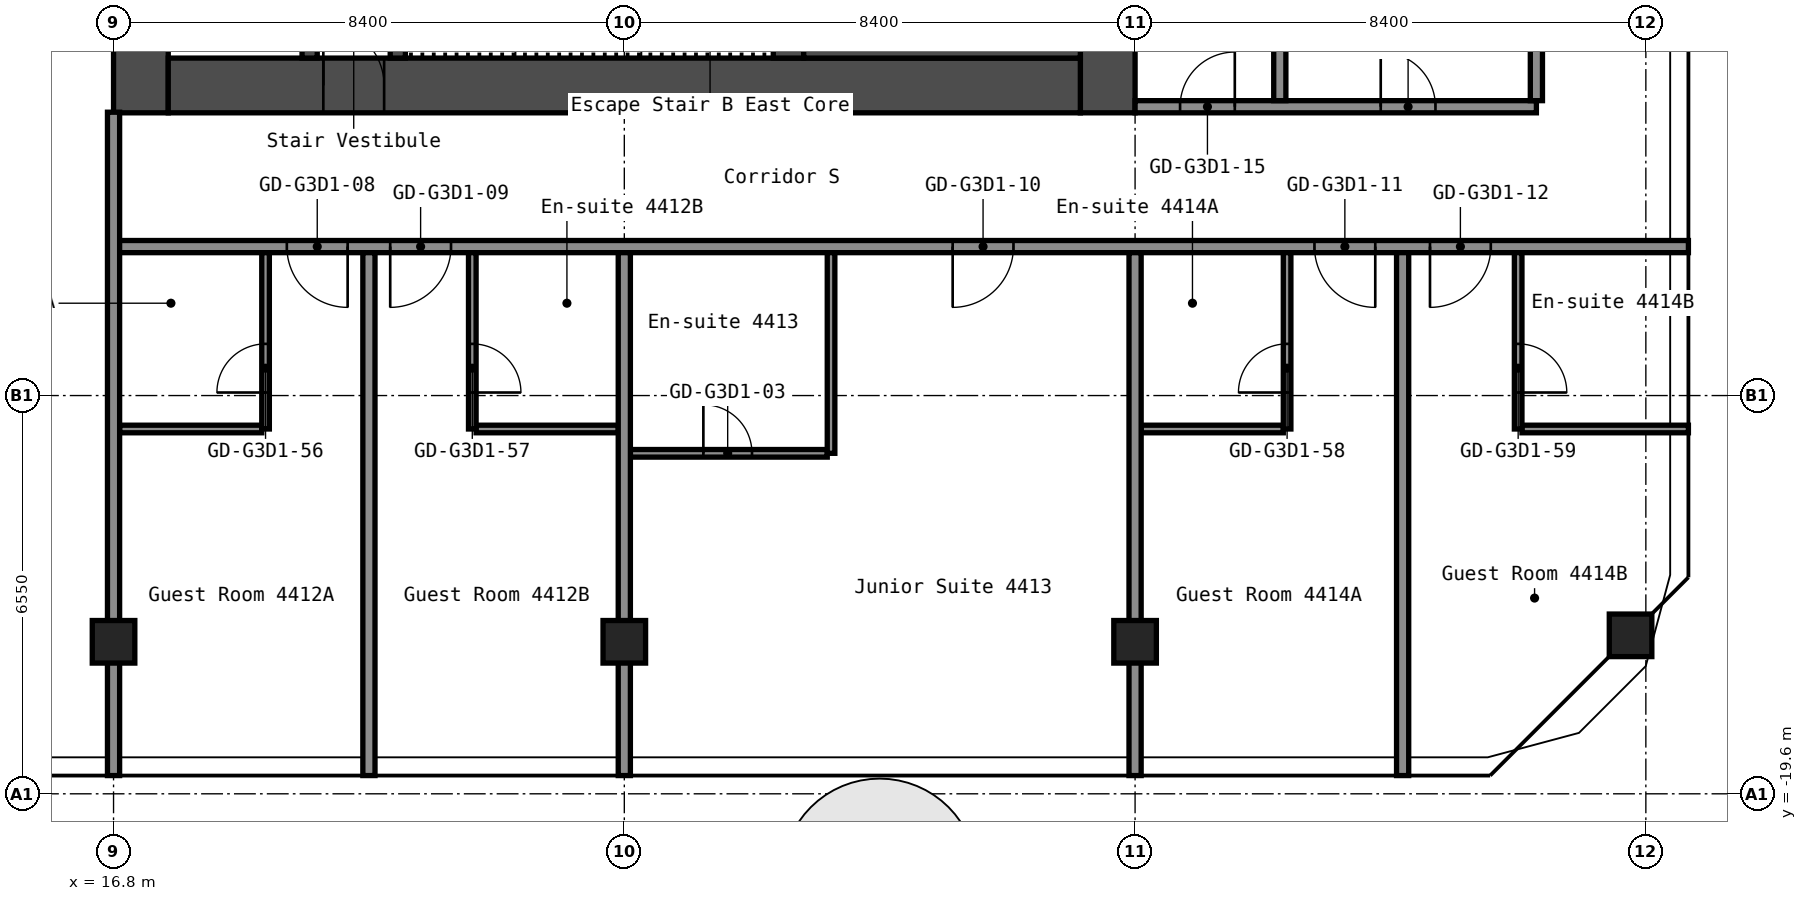
"""IFC4 building model, lengths in metres.
Left out: names, types, materials, properties, quantities, classifications, styles, units other than length and angle.
Written with IfcOpenShell. Run it as: python <this file> out.ifc"""

import sys

from ifc_helpers import new_model, si_unit, direction, frame, frame_2d, origin, origin_2d, place, context, subcontext, project, spatial, rectangle, hollow_rectangle, extrude, element, fill, save


model = new_model("IFC4")
c1 = context("Model", 3, precision=1e-05, world=origin(), true_north=direction((0.0, 1.0)))
c2 = subcontext(c1, "Body", "Model", "MODEL_VIEW")
j1 = project(units=[si_unit("LENGTHUNIT", "METRE"), si_unit("PLANEANGLEUNIT", "RADIAN")], contexts=[c1])
p1 = place(None, origin())
s1 = spatial("IfcSite", under=j1, at=p1, CompositionType="ELEMENT")
p2 = place(p1, origin())
s2 = spatial("IfcBuilding", under=s1, at=p2, CompositionType="ELEMENT")
p3 = place(p2, frame((0.0, 0.0, 156.6)))
s3 = spatial("IfcBuildingStorey", under=s2, at=p3, CompositionType="ELEMENT", Elevation=156.6)
for number, where, z_axis, x_axis in (
    (1, (16.8, -17.1, 0.0), (0.0, 0.0, 1.0), (1.0, 0.0, 0.0)),
    (2, (25.2, -17.1, 0.0), (0.0, 0.0, 1.0), (1.0, 0.0, 0.0)),
    (3, (33.6, -17.1, 0.0), (0.0, 0.0, 1.0), (1.0, 0.0, 0.0)),
    (4, (41.749, -16.994, 0.0), (0.0, 0.0, 1.0), (1.0, 0.0, 0.0)),
):
    element("IfcColumn", number, at=place(p3, frame(where, z_axis=z_axis, x_axis=x_axis)), inside=s3, PredefinedType="COLUMN", context=c2, shape_type="SweptSolid", body=[
        extrude(hollow_rectangle(XDim=0.7, YDim=0.7, WallThickness=0.028, at=origin_2d()), origin(), (0.0, 0.0, 1.0), 2.75),
    ])
p4 = place(p3, frame((17.25, -8.4, 0.0), z_axis=(0.0, 0.0, 1.0), x_axis=(0.0, 1.0, 0.0)))
e5 = element("IfcWall", 5, at=p4, inside=s3, PredefinedType="SHEAR", context=c2, shape_type="SweptSolid", body=[
    extrude(rectangle(XDim=16.8, YDim=0.9, at=frame_2d((8.4, 0.0))), origin(), (0.0, 0.0, 1.0), 2.75),
])
p5 = place(p4, frame((7.1, 0.0, 0.0)))
e6 = element("IfcOpeningElement", 6, at=p5, cuts=e5, PredefinedType="OPENING", context=c2, shape_type="SweptSolid", body=[
    extrude(rectangle(XDim=1.6, YDim=2.1, at=frame_2d((0.8, 1.05))), frame((0.0, 0.46, 0.0), z_axis=(0.0, -1.0, 0.0), x_axis=(1.0, 0.0, 0.0)), (0.0, 0.0, 1.0), 0.92),
])
p6 = place(p3, frame((33.15, -8.4, 0.0), z_axis=(0.0, 0.0, 1.0), x_axis=(0.0, 1.0, 0.0)))
e7 = element("IfcWall", 7, at=p6, inside=s3, PredefinedType="SHEAR", context=c2, shape_type="SweptSolid", body=[
    extrude(rectangle(XDim=16.8, YDim=0.9, at=frame_2d((8.4, 0.0))), origin(), (0.0, 0.0, 1.0), 2.75),
])
p7 = place(p3, frame((17.7, -7.95, 0.0), z_axis=(0.0, 0.0, 1.0), x_axis=(1.0, 0.0, 0.0)))
e8 = element("IfcWall", 8, at=p7, inside=s3, PredefinedType="SHEAR", context=c2, shape_type="SweptSolid", body=[
    extrude(rectangle(XDim=15.0, YDim=0.9, at=frame_2d((7.5, 0.0))), origin(), (0.0, 0.0, 1.0), 2.75),
])
p8 = place(p7, frame((2.55, 0.0, 0.0)))
e9 = element("IfcOpeningElement", 9, at=p8, cuts=e8, PredefinedType="OPENING", context=c2, shape_type="SweptSolid", body=[
    extrude(rectangle(XDim=1.0, YDim=2.1, at=frame_2d((0.5, 1.05))), frame((0.0, 0.46, 0.0), z_axis=(0.0, -1.0, 0.0), x_axis=(1.0, 0.0, 0.0)), (0.0, 0.0, 1.0), 0.92),
])
p9 = place(p3, frame((20.025, -7.5, 0.0), z_axis=(0.0, 0.0, 1.0), x_axis=(0.0, 1.0, 0.0)))
e10 = element("IfcWall", 10, at=p9, inside=s3, PredefinedType="SHEAR", context=c2, shape_type="SweptSolid", body=[
    extrude(rectangle(XDim=6.3, YDim=0.25, at=frame_2d((3.15, 0.0))), origin(), (0.0, 0.0, 1.0), 2.75),
])
p10 = place(p9, frame((2.4, 0.0, 0.0)))
e11 = element("IfcOpeningElement", 11, at=p10, cuts=e10, PredefinedType="OPENING", context=c2, shape_type="SweptSolid", body=[
    extrude(rectangle(XDim=1.0, YDim=2.1, at=frame_2d((0.5, 1.05))), frame((0.0, 0.135, 0.0), z_axis=(0.0, -1.0, 0.0), x_axis=(1.0, 0.0, 0.0)), (0.0, 0.0, 1.0), 0.27),
])
p11 = place(p3, frame((21.475, -7.5, 0.0), z_axis=(0.0, 0.0, 1.0), x_axis=(0.0, 1.0, 0.0)))
e12 = element("IfcWall", 12, at=p11, inside=s3, PredefinedType="SHEAR", context=c2, shape_type="SweptSolid", body=[
    extrude(rectangle(XDim=3.75, YDim=0.25, at=frame_2d((1.875, 0.0))), origin(), (0.0, 0.0, 1.0), 2.75),
])
p12 = place(p11, frame((1.3, 0.0, 0.0)))
e13 = element("IfcOpeningElement", 13, at=p12, cuts=e12, PredefinedType="OPENING", context=c2, shape_type="SweptSolid", body=[
    extrude(rectangle(XDim=1.2, YDim=2.1, at=frame_2d((0.6, 1.05))), frame((0.0, 0.135, 0.0), z_axis=(0.0, -1.0, 0.0), x_axis=(1.0, 0.0, 0.0)), (0.0, 0.0, 1.0), 0.27),
])
p13 = place(p3, frame((27.9, -7.5, 0.0), z_axis=(0.0, 0.0, 1.0), x_axis=(0.0, 1.0, 0.0)))
e14 = element("IfcWall", 14, at=p13, inside=s3, PredefinedType="SHEAR", context=c2, shape_type="SweptSolid", body=[
    extrude(rectangle(XDim=3.75, YDim=0.5, at=frame_2d((1.875, 0.0))), origin(), (0.0, 0.0, 1.0), 2.75),
])
p14 = place(p3, frame((28.15, -6.75, 0.0), z_axis=(0.0, 0.0, 1.0), x_axis=(1.0, 0.0, 0.0)))
e15 = element("IfcWall", 15, at=p14, inside=s3, PredefinedType="SHEAR", context=c2, shape_type="SweptSolid", body=[
    extrude(rectangle(XDim=4.55, YDim=1.5, at=frame_2d((2.275, 0.0))), origin(), (0.0, 0.0, 1.0), 2.75),
])
p15 = place(p3, frame((25.3, -14.0, 0.0), z_axis=(0.0, 0.0, 1.0), x_axis=(1.0, 0.0, 0.0)))
e16 = element("IfcWall", 16, at=p15, inside=s3, PredefinedType="PARTITIONING", context=c2, shape_type="SweptSolid", body=[
    extrude(rectangle(XDim=3.238, YDim=0.125, at=frame_2d((1.619, 0.0))), origin(), (0.0, 0.0, 1.0), 2.75),
])
p16 = place(p15, frame((1.2, 0.0, 0.0)))
e17 = element("IfcOpeningElement", 17, at=p16, cuts=e16, PredefinedType="OPENING", context=c2, shape_type="SweptSolid", body=[
    extrude(rectangle(XDim=0.8, YDim=2.1, at=frame_2d((0.4, 1.05))), frame((0.0, 0.073, 0.0), z_axis=(0.0, -1.0, 0.0), x_axis=(1.0, 0.0, 0.0)), (0.0, 0.0, 1.0), 0.145),
])
for number, where, z_axis, x_axis in (
    (18, (16.9, -13.6, 0.0), (0.0, 0.0, 1.0), (1.0, 0.0, 0.0)),
    (19, (22.762, -13.6, 0.0), (0.0, 0.0, 1.0), (1.0, 0.0, 0.0)),
    (20, (33.7, -13.6, 0.0), (0.0, 0.0, 1.0), (1.0, 0.0, 0.0)),
):
    element("IfcWall", number, at=place(p3, frame(where, z_axis=z_axis, x_axis=x_axis)), inside=s3, PredefinedType="PARTITIONING", context=c2, shape_type="SweptSolid", body=[
        extrude(rectangle(XDim=2.338, YDim=0.125, at=frame_2d((1.169, 0.0))), origin(), (0.0, 0.0, 1.0), 2.75),
    ])
p17 = place(p3, frame((39.962, -13.6, 0.0), z_axis=(0.0, 0.0, 1.0), x_axis=(1.0, 0.0, 0.0)))
e21 = element("IfcWall", 21, at=p17, inside=s3, PredefinedType="PARTITIONING", context=c2, shape_type="SweptSolid", body=[
    extrude(rectangle(XDim=2.738, YDim=0.125, at=frame_2d((1.369, 0.0))), origin(), (0.0, 0.0, 1.0), 2.75),
])
p18 = place(p3, frame((16.8, -10.6, 0.0), z_axis=(0.0, 0.0, 1.0), x_axis=(1.0, 0.0, 0.0)))
e22 = element("IfcWall", 22, at=p18, inside=s3, PredefinedType="PARTITIONING", context=c2, shape_type="SweptSolid", body=[
    extrude(rectangle(XDim=25.9, YDim=0.2, at=frame_2d((12.95, 0.0))), origin(), (0.0, 0.0, 1.0), 2.75),
])
p19 = place(p18, frame((2.85, 0.0, 0.0)))
e23 = element("IfcOpeningElement", 23, at=p19, cuts=e22, PredefinedType="OPENING", context=c2, shape_type="SweptSolid", body=[
    extrude(rectangle(XDim=1.0, YDim=2.1, at=frame_2d((0.5, 1.05))), frame((0.0, 0.11, 0.0), z_axis=(0.0, -1.0, 0.0), x_axis=(1.0, 0.0, 0.0)), (0.0, 0.0, 1.0), 0.22),
])
p20 = place(p18, frame((4.55, 0.0, 0.0)))
e24 = element("IfcOpeningElement", 24, at=p20, cuts=e22, PredefinedType="OPENING", context=c2, shape_type="SweptSolid", body=[
    extrude(rectangle(XDim=1.0, YDim=2.1, at=frame_2d((0.5, 1.05))), frame((0.0, 0.11, 0.0), z_axis=(0.0, -1.0, 0.0), x_axis=(1.0, 0.0, 0.0)), (0.0, 0.0, 1.0), 0.22),
])
p21 = place(p18, frame((13.8, 0.0, 0.0)))
e25 = element("IfcOpeningElement", 25, at=p21, cuts=e22, PredefinedType="OPENING", context=c2, shape_type="SweptSolid", body=[
    extrude(rectangle(XDim=1.0, YDim=2.1, at=frame_2d((0.5, 1.05))), frame((0.0, 0.11, 0.0), z_axis=(0.0, -1.0, 0.0), x_axis=(1.0, 0.0, 0.0)), (0.0, 0.0, 1.0), 0.22),
])
p22 = place(p18, frame((19.75, 0.0, 0.0)))
e26 = element("IfcOpeningElement", 26, at=p22, cuts=e22, PredefinedType="OPENING", context=c2, shape_type="SweptSolid", body=[
    extrude(rectangle(XDim=1.0, YDim=2.1, at=frame_2d((0.5, 1.05))), frame((0.0, 0.11, 0.0), z_axis=(0.0, -1.0, 0.0), x_axis=(1.0, 0.0, 0.0)), (0.0, 0.0, 1.0), 0.22),
])
p23 = place(p18, frame((21.65, 0.0, 0.0)))
e27 = element("IfcOpeningElement", 27, at=p23, cuts=e22, PredefinedType="OPENING", context=c2, shape_type="SweptSolid", body=[
    extrude(rectangle(XDim=1.0, YDim=2.1, at=frame_2d((0.5, 1.05))), frame((0.0, 0.11, 0.0), z_axis=(0.0, -1.0, 0.0), x_axis=(1.0, 0.0, 0.0)), (0.0, 0.0, 1.0), 0.22),
])
p24 = place(p3, frame((33.6, -8.3, 0.0), z_axis=(0.0, 0.0, 1.0), x_axis=(1.0, 0.0, 0.0)))
e28 = element("IfcWall", 28, at=p24, inside=s3, PredefinedType="PARTITIONING", context=c2, shape_type="SweptSolid", body=[
    extrude(rectangle(XDim=6.6, YDim=0.2, at=frame_2d((3.3, 0.0))), origin(), (0.0, 0.0, 1.0), 2.75),
])
p25 = place(p24, frame((0.74, 0.0, 0.0)))
e29 = element("IfcOpeningElement", 29, at=p25, cuts=e28, PredefinedType="OPENING", context=c2, shape_type="SweptSolid", body=[
    extrude(rectangle(XDim=0.9, YDim=2.1, at=frame_2d((0.45, 1.05))), frame((0.0, 0.11, 0.0), z_axis=(0.0, -1.0, 0.0), x_axis=(1.0, 0.0, 0.0)), (0.0, 0.0, 1.0), 0.22),
])
p26 = place(p24, frame((4.04, 0.0, 0.0)))
e30 = element("IfcOpeningElement", 30, at=p26, cuts=e28, PredefinedType="OPENING", context=c2, shape_type="SweptSolid", body=[
    extrude(rectangle(XDim=0.9, YDim=2.1, at=frame_2d((0.45, 1.05))), frame((0.0, 0.11, 0.0), z_axis=(0.0, -1.0, 0.0), x_axis=(1.0, 0.0, 0.0)), (0.0, 0.0, 1.0), 0.22),
])
p27 = place(p3, frame((16.8, -19.3, 0.0), z_axis=(0.0, 0.0, 1.0), x_axis=(0.0, 1.0, 0.0)))
e31 = element("IfcWall", 31, at=p27, inside=s3, PredefinedType="PARTITIONING", context=c2, shape_type="SweptSolid", body=[
    extrude(rectangle(XDim=10.91, YDim=0.2, at=frame_2d((5.455, 0.0))), origin(), (0.0, 0.0, 1.0), 2.75),
])
p28 = place(p3, frame((19.3, -13.6, 0.0), z_axis=(0.0, 0.0, 1.0), x_axis=(0.0, 1.0, 0.0)))
e32 = element("IfcWall", 32, at=p28, inside=s3, PredefinedType="PARTITIONING", context=c2, shape_type="SweptSolid", body=[
    extrude(rectangle(XDim=2.9, YDim=0.125, at=frame_2d((1.45, 0.0))), origin(), (0.0, 0.0, 1.0), 2.75),
])
p29 = place(p28, frame((0.6, 0.0, 0.0)))
e33 = element("IfcOpeningElement", 33, at=p29, cuts=e32, PredefinedType="OPENING", context=c2, shape_type="SweptSolid", body=[
    extrude(rectangle(XDim=0.8, YDim=2.1, at=frame_2d((0.4, 1.05))), frame((0.0, 0.073, 0.0), z_axis=(0.0, -1.0, 0.0), x_axis=(1.0, 0.0, 0.0)), (0.0, 0.0, 1.0), 0.145),
])
p30 = place(p3, frame((21.0, -19.3, 0.0), z_axis=(0.0, 0.0, 1.0), x_axis=(0.0, 1.0, 0.0)))
e34 = element("IfcWall", 34, at=p30, inside=s3, PredefinedType="PARTITIONING", context=c2, shape_type="SweptSolid", body=[
    extrude(rectangle(XDim=8.6, YDim=0.2, at=frame_2d((4.3, 0.0))), origin(), (0.0, 0.0, 1.0), 2.75),
])
p31 = place(p3, frame((22.7, -13.6, 0.0), z_axis=(0.0, 0.0, 1.0), x_axis=(0.0, 1.0, 0.0)))
e35 = element("IfcWall", 35, at=p31, inside=s3, PredefinedType="PARTITIONING", context=c2, shape_type="SweptSolid", body=[
    extrude(rectangle(XDim=2.9, YDim=0.125, at=frame_2d((1.45, 0.0))), origin(), (0.0, 0.0, 1.0), 2.75),
])
p32 = place(p31, frame((0.6, 0.0, 0.0)))
e36 = element("IfcOpeningElement", 36, at=p32, cuts=e35, PredefinedType="OPENING", context=c2, shape_type="SweptSolid", body=[
    extrude(rectangle(XDim=0.8, YDim=2.1, at=frame_2d((0.4, 1.05))), frame((0.0, 0.073, 0.0), z_axis=(0.0, -1.0, 0.0), x_axis=(1.0, 0.0, 0.0)), (0.0, 0.0, 1.0), 0.145),
])
p33 = place(p3, frame((25.2, -19.3, 0.0), z_axis=(0.0, 0.0, 1.0), x_axis=(0.0, 1.0, 0.0)))
e37 = element("IfcWall", 37, at=p33, inside=s3, PredefinedType="PARTITIONING", context=c2, shape_type="SweptSolid", body=[
    extrude(rectangle(XDim=8.6, YDim=0.2, at=frame_2d((4.3, 0.0))), origin(), (0.0, 0.0, 1.0), 2.75),
])
p34 = place(p3, frame((28.6, -14.0, 0.0), z_axis=(0.0, 0.0, 1.0), x_axis=(0.0, 1.0, 0.0)))
e38 = element("IfcWall", 38, at=p34, inside=s3, PredefinedType="PARTITIONING", context=c2, shape_type="SweptSolid", body=[
    extrude(rectangle(XDim=3.3, YDim=0.125, at=frame_2d((1.65, 0.0))), origin(), (0.0, 0.0, 1.0), 2.75),
])
p35 = place(p3, frame((33.6, -19.3, 0.0), z_axis=(0.0, 0.0, 1.0), x_axis=(0.0, 1.0, 0.0)))
e39 = element("IfcWall", 39, at=p35, inside=s3, PredefinedType="PARTITIONING", context=c2, shape_type="SweptSolid", body=[
    extrude(rectangle(XDim=8.6, YDim=0.2, at=frame_2d((4.3, 0.0))), origin(), (0.0, 0.0, 1.0), 2.75),
])
p36 = place(p3, frame((35.98, -8.2, 0.0), z_axis=(0.0, 0.0, 1.0), x_axis=(0.0, 1.0, 0.0)))
e40 = element("IfcWall", 40, at=p36, inside=s3, PredefinedType="PARTITIONING", context=c2, shape_type="SweptSolid", body=[
    extrude(rectangle(XDim=8.2, YDim=0.2, at=frame_2d((4.1, 0.0))), origin(), (0.0, 0.0, 1.0), 2.75),
])
p37 = place(p3, frame((36.1, -13.6, 0.0), z_axis=(0.0, 0.0, 1.0), x_axis=(0.0, 1.0, 0.0)))
e41 = element("IfcWall", 41, at=p37, inside=s3, PredefinedType="PARTITIONING", context=c2, shape_type="SweptSolid", body=[
    extrude(rectangle(XDim=2.9, YDim=0.125, at=frame_2d((1.45, 0.0))), origin(), (0.0, 0.0, 1.0), 2.75),
])
p38 = place(p37, frame((0.6, 0.0, 0.0)))
e42 = element("IfcOpeningElement", 42, at=p38, cuts=e41, PredefinedType="OPENING", context=c2, shape_type="SweptSolid", body=[
    extrude(rectangle(XDim=0.8, YDim=2.1, at=frame_2d((0.4, 1.05))), frame((0.0, 0.073, 0.0), z_axis=(0.0, -1.0, 0.0), x_axis=(1.0, 0.0, 0.0)), (0.0, 0.0, 1.0), 0.145),
])
p39 = place(p3, frame((38.0, -19.3, 0.0), z_axis=(0.0, 0.0, 1.0), x_axis=(0.0, 1.0, 0.0)))
e43 = element("IfcWall", 43, at=p39, inside=s3, PredefinedType="PARTITIONING", context=c2, shape_type="SweptSolid", body=[
    extrude(rectangle(XDim=8.6, YDim=0.2, at=frame_2d((4.3, 0.0))), origin(), (0.0, 0.0, 1.0), 2.75),
])
p40 = place(p3, frame((39.9, -13.6, 0.0), z_axis=(0.0, 0.0, 1.0), x_axis=(0.0, 1.0, 0.0)))
e44 = element("IfcWall", 44, at=p40, inside=s3, PredefinedType="PARTITIONING", context=c2, shape_type="SweptSolid", body=[
    extrude(rectangle(XDim=2.9, YDim=0.125, at=frame_2d((1.45, 0.0))), origin(), (0.0, 0.0, 1.0), 2.75),
])
p41 = place(p40, frame((0.6, 0.0, 0.0)))
e45 = element("IfcOpeningElement", 45, at=p41, cuts=e44, PredefinedType="OPENING", context=c2, shape_type="SweptSolid", body=[
    extrude(rectangle(XDim=0.8, YDim=2.1, at=frame_2d((0.4, 1.05))), frame((0.0, 0.073, 0.0), z_axis=(0.0, -1.0, 0.0), x_axis=(1.0, 0.0, 0.0)), (0.0, 0.0, 1.0), 0.145),
])
p42 = place(p3, frame((40.2, -8.2, 0.0), z_axis=(0.0, 0.0, 1.0), x_axis=(0.0, 1.0, 0.0)))
e46 = element("IfcWall", 46, at=p42, inside=s3, PredefinedType="PARTITIONING", context=c2, shape_type="SweptSolid", body=[
    extrude(rectangle(XDim=16.4, YDim=0.2, at=frame_2d((8.2, 0.0))), origin(), (0.0, 0.0, 1.0), 2.75),
])
p43 = place(p8, origin())
e47 = element("IfcDoor", 47, at=p43, inside=s3, OperationType="SINGLE_SWING_RIGHT", PredefinedType="DOOR", context=c2, shape_type="SweptSolid", body=[
    extrude(rectangle(XDim=1.0, YDim=2.1, at=frame_2d((0.5, 1.05))), frame((0.0, 0.025, 0.0), z_axis=(0.0, -1.0, 0.0), x_axis=(1.0, 0.0, 0.0)), (0.0, 0.0, 1.0), 0.05),
])
fill(e9, e47)
p44 = place(p16, origin())
e48 = element("IfcDoor", 48, at=p44, inside=s3, OperationType="SINGLE_SWING_RIGHT", PredefinedType="DOOR", context=c2, shape_type="SweptSolid", body=[
    extrude(rectangle(XDim=0.8, YDim=2.1, at=frame_2d((0.4, 1.05))), frame((0.0, 0.025, 0.0), z_axis=(0.0, -1.0, 0.0), x_axis=(1.0, 0.0, 0.0)), (0.0, 0.0, 1.0), 0.05),
])
fill(e17, e48)
p45 = place(p19, origin())
e49 = element("IfcDoor", 49, at=p45, inside=s3, OperationType="SINGLE_SWING_RIGHT", PredefinedType="DOOR", context=c2, shape_type="SweptSolid", body=[
    extrude(rectangle(XDim=1.0, YDim=2.1, at=frame_2d((0.5, 1.05))), frame((0.0, 0.025, 0.0), z_axis=(0.0, -1.0, 0.0), x_axis=(1.0, 0.0, 0.0)), (0.0, 0.0, 1.0), 0.05),
])
fill(e23, e49)
p46 = place(p20, origin())
e50 = element("IfcDoor", 50, at=p46, inside=s3, OperationType="SINGLE_SWING_LEFT", PredefinedType="DOOR", context=c2, shape_type="SweptSolid", body=[
    extrude(rectangle(XDim=1.0, YDim=2.1, at=frame_2d((0.5, 1.05))), frame((0.0, 0.025, 0.0), z_axis=(0.0, -1.0, 0.0), x_axis=(1.0, 0.0, 0.0)), (0.0, 0.0, 1.0), 0.05),
])
fill(e24, e50)
p47 = place(p21, origin())
e51 = element("IfcDoor", 51, at=p47, inside=s3, OperationType="SINGLE_SWING_LEFT", PredefinedType="DOOR", context=c2, shape_type="SweptSolid", body=[
    extrude(rectangle(XDim=1.0, YDim=2.1, at=frame_2d((0.5, 1.05))), frame((0.0, 0.025, 0.0), z_axis=(0.0, -1.0, 0.0), x_axis=(1.0, 0.0, 0.0)), (0.0, 0.0, 1.0), 0.05),
])
fill(e25, e51)
p48 = place(p22, origin())
e52 = element("IfcDoor", 52, at=p48, inside=s3, OperationType="SINGLE_SWING_RIGHT", PredefinedType="DOOR", context=c2, shape_type="SweptSolid", body=[
    extrude(rectangle(XDim=1.0, YDim=2.1, at=frame_2d((0.5, 1.05))), frame((0.0, 0.025, 0.0), z_axis=(0.0, -1.0, 0.0), x_axis=(1.0, 0.0, 0.0)), (0.0, 0.0, 1.0), 0.05),
])
fill(e26, e52)
p49 = place(p23, origin())
e53 = element("IfcDoor", 53, at=p49, inside=s3, OperationType="SINGLE_SWING_LEFT", PredefinedType="DOOR", context=c2, shape_type="SweptSolid", body=[
    extrude(rectangle(XDim=1.0, YDim=2.1, at=frame_2d((0.5, 1.05))), frame((0.0, 0.025, 0.0), z_axis=(0.0, -1.0, 0.0), x_axis=(1.0, 0.0, 0.0)), (0.0, 0.0, 1.0), 0.05),
])
fill(e27, e53)
p50 = place(p25, origin())
e54 = element("IfcDoor", 54, at=p50, inside=s3, OperationType="SINGLE_SWING_LEFT", PredefinedType="DOOR", context=c2, shape_type="SweptSolid", body=[
    extrude(rectangle(XDim=0.9, YDim=2.1, at=frame_2d((0.45, 1.05))), frame((0.0, 0.025, 0.0), z_axis=(0.0, -1.0, 0.0), x_axis=(1.0, 0.0, 0.0)), (0.0, 0.0, 1.0), 0.05),
])
fill(e29, e54)
p51 = place(p26, origin())
e55 = element("IfcDoor", 55, at=p51, inside=s3, OperationType="SINGLE_SWING_RIGHT", PredefinedType="DOOR", context=c2, shape_type="SweptSolid", body=[
    extrude(rectangle(XDim=0.9, YDim=2.1, at=frame_2d((0.45, 1.05))), frame((0.0, 0.025, 0.0), z_axis=(0.0, -1.0, 0.0), x_axis=(1.0, 0.0, 0.0)), (0.0, 0.0, 1.0), 0.05),
])
fill(e30, e55)
p52 = place(p29, origin())
e56 = element("IfcDoor", 56, at=p52, inside=s3, OperationType="SINGLE_SWING_RIGHT", PredefinedType="DOOR", context=c2, shape_type="SweptSolid", body=[
    extrude(rectangle(XDim=0.8, YDim=2.1, at=frame_2d((0.4, 1.05))), frame((0.0, 0.025, 0.0), z_axis=(0.0, -1.0, 0.0), x_axis=(1.0, 0.0, 0.0)), (0.0, 0.0, 1.0), 0.05),
])
fill(e33, e56)
p53 = place(p32, origin())
e57 = element("IfcDoor", 57, at=p53, inside=s3, OperationType="SINGLE_SWING_LEFT", PredefinedType="DOOR", context=c2, shape_type="SweptSolid", body=[
    extrude(rectangle(XDim=0.8, YDim=2.1, at=frame_2d((0.4, 1.05))), frame((0.0, 0.025, 0.0), z_axis=(0.0, -1.0, 0.0), x_axis=(1.0, 0.0, 0.0)), (0.0, 0.0, 1.0), 0.05),
])
fill(e36, e57)
p54 = place(p38, origin())
e58 = element("IfcDoor", 58, at=p54, inside=s3, OperationType="SINGLE_SWING_RIGHT", PredefinedType="DOOR", context=c2, shape_type="SweptSolid", body=[
    extrude(rectangle(XDim=0.8, YDim=2.1, at=frame_2d((0.4, 1.05))), frame((0.0, 0.025, 0.0), z_axis=(0.0, -1.0, 0.0), x_axis=(1.0, 0.0, 0.0)), (0.0, 0.0, 1.0), 0.05),
])
fill(e42, e58)
p55 = place(p41, origin())
e59 = element("IfcDoor", 59, at=p55, inside=s3, OperationType="SINGLE_SWING_LEFT", PredefinedType="DOOR", context=c2, shape_type="SweptSolid", body=[
    extrude(rectangle(XDim=0.8, YDim=2.1, at=frame_2d((0.4, 1.05))), frame((0.0, 0.025, 0.0), z_axis=(0.0, -1.0, 0.0), x_axis=(1.0, 0.0, 0.0)), (0.0, 0.0, 1.0), 0.05),
])
fill(e45, e59)
save(model, sys.argv[1])
